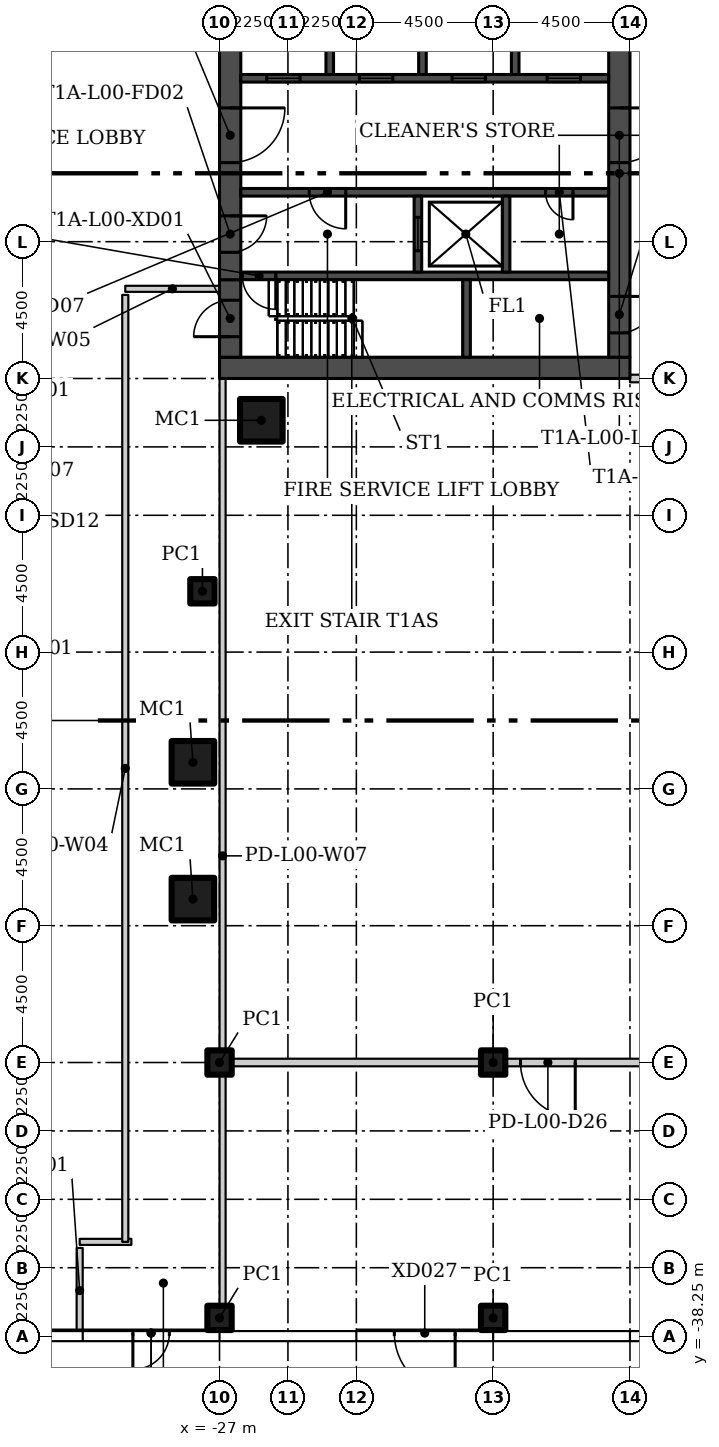
"""IFC4 building model, lengths in metres.
Left out: names, types, materials, properties, quantities, classifications, styles, units other than length and angle.
Written with IfcOpenShell. Run it as: python <this file> out.ifc"""

import sys

from ifc_helpers import new_model, si_unit, direction, frame, frame_2d, origin, origin_2d, place, context, subcontext, project, spatial, rectangle, hollow_rectangle, extrude, element, fill, save


model = new_model("IFC4")
c1 = context("Model", 3, precision=1e-05, world=origin(), true_north=direction((0.0, 1.0)))
c2 = subcontext(c1, "Body", "Model", "MODEL_VIEW")
j1 = project(units=[si_unit("LENGTHUNIT", "METRE"), si_unit("PLANEANGLEUNIT", "RADIAN")], contexts=[c1])
p1 = place(None, origin())
s1 = spatial("IfcSite", under=j1, at=p1, CompositionType="ELEMENT")
p2 = place(p1, origin())
s2 = spatial("IfcBuilding", under=s1, at=p2, CompositionType="ELEMENT")
p3 = place(p2, origin())
s3 = spatial("IfcBuildingStorey", under=s2, at=p3, CompositionType="ELEMENT", Elevation=0.0)
p4 = place(p3, frame((-25.625, -8.125, 0.0)))
e1 = element("IfcColumn", 1, at=p4, inside=s3, PredefinedType="COLUMN", context=c2, shape_type="SweptSolid", body=[
    extrude(hollow_rectangle(XDim=1.4, YDim=1.4, WallThickness=0.06, at=origin_2d()), origin(), (0.0, 0.0, 1.0), 6.5),
])
p5 = place(p3, frame((-27.562, -13.75, 0.0)))
e2 = element("IfcColumn", 2, at=p5, inside=s3, PredefinedType="COLUMN", context=c2, shape_type="SweptSolid", body=[
    extrude(hollow_rectangle(XDim=0.8, YDim=0.8, WallThickness=0.03, at=origin_2d()), origin(), (0.0, 0.0, 1.0), 6.1),
])
for number, where in (
    (3, (-27.875, -19.375, 0.0)),
    (4, (-27.875, -23.875, 0.0)),
):
    element("IfcColumn", number, at=place(p3, frame(where)), inside=s3, PredefinedType="COLUMN", context=c2, shape_type="SweptSolid", body=[
        extrude(hollow_rectangle(XDim=1.4, YDim=1.4, WallThickness=0.06, at=origin_2d()), origin(), (0.0, 0.0, 1.0), 6.1),
    ])
for number, where in (
    (5, (-27.0, -37.65, 0.0)),
    (6, (-27.0, -29.25, 0.0)),
    (7, (-18.0, -37.65, 0.0)),
    (8, (-18.0, -29.25, 0.0)),
):
    element("IfcColumn", number, at=place(p3, frame(where)), inside=s3, PredefinedType="COLUMN", context=c2, shape_type="SweptSolid", body=[
        extrude(hollow_rectangle(XDim=0.8, YDim=0.8, WallThickness=0.03, at=origin_2d()), origin(), (0.0, 0.0, 1.0), 6.1),
    ])
p6 = place(p3, frame((-31.6, -35.35, 0.0), z_axis=(0.0, 0.0, 1.0), x_axis=(0.0, -1.0, 0.0)))
e9 = element("IfcWall", 9, at=p6, inside=s3, PredefinedType="PARTITIONING", context=c2, shape_type="SweptSolid", body=[
    extrude(rectangle(XDim=2.805, YDim=0.2, at=frame_2d((1.402, 0.0))), origin(), (0.0, 0.0, 1.0), 6.1),
])
p7 = place(p3, frame((-29.9, -35.15, 0.0), z_axis=(0.0, 0.0, 1.0), x_axis=(-1.0, 0.0, 0.0)))
e10 = element("IfcWall", 10, at=p7, inside=s3, PredefinedType="PARTITIONING", context=c2, shape_type="SweptSolid", body=[
    extrude(rectangle(XDim=1.7, YDim=0.2, at=frame_2d((0.85, 0.0))), origin(), (0.0, 0.0, 1.0), 6.1),
])
p8 = place(p3, frame((-30.1, -4.0, 0.0), z_axis=(0.0, 0.0, 1.0), x_axis=(0.0, -1.0, 0.0)))
e11 = element("IfcWall", 11, at=p8, inside=s3, PredefinedType="PARTITIONING", context=c2, shape_type="SweptSolid", body=[
    extrude(rectangle(XDim=31.149, YDim=0.2, at=frame_2d((15.575, 0.0))), origin(), (0.0, 0.0, 1.0), 6.1),
])
p9 = place(p3, frame((-27.0, -3.8, 0.0), z_axis=(0.0, 0.0, 1.0), x_axis=(-1.0, 0.0, 0.0)))
e12 = element("IfcWall", 12, at=p9, inside=s3, PredefinedType="PARTITIONING", context=c2, shape_type="SweptSolid", body=[
    extrude(rectangle(XDim=3.1, YDim=0.2, at=frame_2d((1.55, 0.0))), origin(), (0.0, 0.0, 1.0), 6.1),
])
p10 = place(p3, frame((-26.9, -38.155, 0.0), z_axis=(0.0, 0.0, 1.0), x_axis=(0.0, 1.0, 0.0)))
e13 = element("IfcWall", 13, at=p10, inside=s3, PredefinedType="PARTITIONING", context=c2, shape_type="SweptSolid", body=[
    extrude(rectangle(XDim=31.405, YDim=0.2, at=frame_2d((15.703, 0.0))), origin(), (0.0, 0.0, 1.0), 12.1),
])
p11 = place(p3, frame((-13.5, -6.75, 0.0)))
e14 = element("IfcWall", 14, at=p11, inside=s3, PredefinedType="PARTITIONING", context=c2, shape_type="SweptSolid", body=[
    extrude(rectangle(XDim=27.0, YDim=0.25, at=frame_2d((13.5, 0.0))), origin(), (0.0, 0.0, 1.0), 12.1),
])
p12 = place(p11, frame((14.25, 0.0, 0.0)))
e15 = element("IfcOpeningElement", 15, at=p12, cuts=e14, PredefinedType="OPENING", context=c2, shape_type="SweptSolid", body=[
    extrude(rectangle(XDim=1.8, YDim=2.4, at=frame_2d((0.9, 1.2))), frame((0.0, 0.135, 0.0), z_axis=(0.0, -1.0, 0.0), x_axis=(1.0, 0.0, 0.0)), (0.0, 0.0, 1.0), 0.27),
])
p13 = place(p3, frame((27.125, -29.25, 0.0), z_axis=(0.0, 0.0, 1.0), x_axis=(-1.0, 0.0, 0.0)))
e16 = element("IfcWall", 16, at=p13, inside=s3, PredefinedType="PARTITIONING", context=c2, shape_type="SweptSolid", body=[
    extrude(rectangle(XDim=54.025, YDim=0.25, at=frame_2d((27.012, 0.0))), origin(), (0.0, 0.0, 1.0), 12.1),
])
p14 = place(p13, frame((10.025, 0.0, 0.0)))
e17 = element("IfcOpeningElement", 17, at=p14, cuts=e16, PredefinedType="OPENING", context=c2, shape_type="SweptSolid", body=[
    extrude(rectangle(XDim=1.8, YDim=2.4, at=frame_2d((0.9, 1.2))), frame((0.0, 0.135, 0.0), z_axis=(0.0, -1.0, 0.0), x_axis=(1.0, 0.0, 0.0)), (0.0, 0.0, 1.0), 0.27),
])
p15 = place(p13, frame((42.425, 0.0, 0.0)))
e18 = element("IfcOpeningElement", 18, at=p15, cuts=e16, PredefinedType="OPENING", context=c2, shape_type="SweptSolid", body=[
    extrude(rectangle(XDim=1.8, YDim=2.4, at=frame_2d((0.9, 1.2))), frame((0.0, 0.135, 0.0), z_axis=(0.0, -1.0, 0.0), x_axis=(1.0, 0.0, 0.0)), (0.0, 0.0, 1.0), 0.27),
])
p16 = place(p3, frame((-26.993, -38.15, 0.0), z_axis=(0.0, 0.0, 1.0), x_axis=(-1.0, 0.0, 0.0)))
e19 = element("IfcWall", 19, at=p16, inside=s3, PredefinedType="SOLIDWALL", context=c2, shape_type="SweptSolid", body=[
    extrude(rectangle(XDim=4.514, YDim=0.2, at=frame_2d((2.257, 0.0))), origin(), (0.0, 0.0, 1.0), 3.0),
])
p17 = place(p16, frame((1.657, 0.0, 0.0)))
e20 = element("IfcOpeningElement", 20, at=p17, cuts=e19, PredefinedType="OPENING", context=c2, shape_type="SweptSolid", body=[
    extrude(rectangle(XDim=1.2, YDim=2.4, at=frame_2d((0.6, 1.2))), frame((0.0, 0.11, 0.0), z_axis=(0.0, -1.0, 0.0), x_axis=(1.0, 0.0, 0.0)), (0.0, 0.0, 1.0), 0.22),
])
p18 = place(p3, frame((-31.533, -38.15, 0.0), z_axis=(0.0, 0.0, 1.0), x_axis=(-1.0, 0.0, 0.0)))
e21 = element("IfcWall", 21, at=p18, inside=s3, PredefinedType="SOLIDWALL", context=c2, shape_type="SweptSolid", body=[
    extrude(rectangle(XDim=4.434, YDim=0.2, at=frame_2d((2.217, 0.0))), origin(), (0.0, 0.0, 1.0), 3.0),
])
p19 = place(p18, frame((1.217, 0.0, 0.0)))
e22 = element("IfcOpeningElement", 22, at=p19, cuts=e21, PredefinedType="OPENING", context=c2, shape_type="SweptSolid", body=[
    extrude(rectangle(XDim=2.0, YDim=2.4, at=frame_2d((1.0, 1.2))), frame((0.0, 0.11, 0.0), z_axis=(0.0, -1.0, 0.0), x_axis=(1.0, 0.0, 0.0)), (0.0, 0.0, 1.0), 0.22),
])
p20 = place(p3, frame((-18.04, -38.15, 0.0), z_axis=(0.0, 0.0, 1.0), x_axis=(-1.0, 0.0, 0.0)))
e23 = element("IfcWall", 23, at=p20, inside=s3, PredefinedType="SOLIDWALL", context=c2, shape_type="SweptSolid", body=[
    extrude(rectangle(XDim=4.42, YDim=0.2, at=frame_2d((2.21, 0.0))), origin(), (0.0, 0.0, 1.0), 3.0),
])
p21 = place(p20, frame((1.21, 0.0, 0.0)))
e24 = element("IfcOpeningElement", 24, at=p21, cuts=e23, PredefinedType="OPENING", context=c2, shape_type="SweptSolid", body=[
    extrude(rectangle(XDim=2.0, YDim=2.4, at=frame_2d((1.0, 1.2))), frame((0.0, 0.11, 0.0), z_axis=(0.0, -1.0, 0.0), x_axis=(1.0, 0.0, 0.0)), (0.0, 0.0, 1.0), 0.22),
])
p22 = place(p3, frame((-27.0, -6.4, 0.0)))
e25 = element("IfcWall", 25, at=p22, inside=s3, PredefinedType="SHEAR", context=c2, shape_type="SweptSolid", body=[
    extrude(rectangle(XDim=13.5, YDim=0.7, at=frame_2d((6.75, 0.0))), origin(), (0.0, 0.0, 1.0), 6.1),
])
p23 = place(p3, frame((-26.65, -6.05, 0.0), z_axis=(0.0, 0.0, 1.0), x_axis=(0.0, 1.0, 0.0)))
e26 = element("IfcWall", 26, at=p23, inside=s3, PredefinedType="SHEAR", context=c2, shape_type="SweptSolid", body=[
    extrude(rectangle(XDim=2.55, YDim=0.7, at=frame_2d((1.275, 0.0))), origin(), (0.0, 0.0, 1.0), 6.1),
])
p24 = place(p23, frame((0.675, 0.0, 0.0)))
e27 = element("IfcOpeningElement", 27, at=p24, cuts=e26, PredefinedType="OPENING", context=c2, shape_type="SweptSolid", body=[
    extrude(rectangle(XDim=1.2, YDim=2.4, at=frame_2d((0.6, 1.2))), frame((0.0, 0.36, 0.0), z_axis=(0.0, -1.0, 0.0), x_axis=(1.0, 0.0, 0.0)), (0.0, 0.0, 1.0), 0.72),
])
p25 = place(p3, frame((-26.65, 6.05, 0.0), z_axis=(0.0, 0.0, 1.0), x_axis=(0.0, -1.0, 0.0)))
e28 = element("IfcWall", 28, at=p25, inside=s3, PredefinedType="SHEAR", context=c2, shape_type="SweptSolid", body=[
    extrude(rectangle(XDim=9.55, YDim=0.7, at=frame_2d((4.775, 0.0))), origin(), (0.0, 0.0, 1.0), 6.1),
])
p26 = place(p25, frame((7.45, 0.0, 0.0)))
e29 = element("IfcOpeningElement", 29, at=p26, cuts=e28, PredefinedType="OPENING", context=c2, shape_type="SweptSolid", body=[
    extrude(rectangle(XDim=1.2, YDim=2.1, at=frame_2d((0.6, 1.05))), frame((0.0, 0.36, 0.0), z_axis=(0.0, -1.0, 0.0), x_axis=(1.0, 0.0, 0.0)), (0.0, 0.0, 1.0), 0.72),
])
p27 = place(p25, frame((3.9, 0.0, 0.0)))
e30 = element("IfcOpeningElement", 30, at=p27, cuts=e28, PredefinedType="OPENING", context=c2, shape_type="SweptSolid", body=[
    extrude(rectangle(XDim=1.8, YDim=2.4, at=frame_2d((0.9, 1.2))), frame((0.0, 0.36, 0.0), z_axis=(0.0, -1.0, 0.0), x_axis=(1.0, 0.0, 0.0)), (0.0, 0.0, 1.0), 0.72),
])
p28 = place(p3, frame((-13.85, 6.05, 0.0), z_axis=(0.0, 0.0, 1.0), x_axis=(0.0, -1.0, 0.0)))
e31 = element("IfcWall", 31, at=p28, inside=s3, PredefinedType="SHEAR", context=c2, shape_type="SweptSolid", body=[
    extrude(rectangle(XDim=12.1, YDim=0.7, at=frame_2d((6.05, 0.0))), origin(), (0.0, 0.0, 1.0), 6.1),
])
p29 = place(p28, frame((10.1, 0.0, 0.0)))
e32 = element("IfcOpeningElement", 32, at=p29, cuts=e31, PredefinedType="OPENING", context=c2, shape_type="SweptSolid", body=[
    extrude(rectangle(XDim=1.2, YDim=2.1, at=frame_2d((0.6, 1.05))), frame((0.0, 0.36, 0.0), z_axis=(0.0, -1.0, 0.0), x_axis=(1.0, 0.0, 0.0)), (0.0, 0.0, 1.0), 0.72),
])
p30 = place(p28, frame((3.9, 0.0, 0.0)))
e33 = element("IfcOpeningElement", 33, at=p30, cuts=e31, PredefinedType="OPENING", context=c2, shape_type="SweptSolid", body=[
    extrude(rectangle(XDim=1.8, YDim=2.4, at=frame_2d((0.9, 1.2))), frame((0.0, 0.36, 0.0), z_axis=(0.0, -1.0, 0.0), x_axis=(1.0, 0.0, 0.0)), (0.0, 0.0, 1.0), 0.72),
])
p31 = place(p3, frame((-14.2, -3.375, 0.0), z_axis=(0.0, 0.0, 1.0), x_axis=(-1.0, 0.0, 0.0)))
e34 = element("IfcWall", 34, at=p31, inside=s3, PredefinedType="SHEAR", context=c2, shape_type="SweptSolid", body=[
    extrude(rectangle(XDim=12.1, YDim=0.25, at=frame_2d((6.05, 0.0))), origin(), (0.0, 0.0, 1.0), 6.1),
])
p32 = place(p31, frame((10.95, 0.0, 0.0)))
e35 = element("IfcOpeningElement", 35, at=p32, cuts=e34, PredefinedType="OPENING", context=c2, shape_type="SweptSolid", body=[
    extrude(rectangle(XDim=1.1, YDim=2.1, at=frame_2d((0.55, 1.05))), frame((0.0, 0.135, 0.0), z_axis=(0.0, -1.0, 0.0), x_axis=(1.0, 0.0, 0.0)), (0.0, 0.0, 1.0), 0.27),
])
p33 = place(p3, frame((-18.875, -6.05, 0.0), z_axis=(0.0, 0.0, 1.0), x_axis=(0.0, 1.0, 0.0)))
e36 = element("IfcWall", 36, at=p33, inside=s3, PredefinedType="SHEAR", context=c2, shape_type="SweptSolid", body=[
    extrude(rectangle(XDim=2.55, YDim=0.25, at=frame_2d((1.275, 0.0))), origin(), (0.0, 0.0, 1.0), 6.1),
])
p34 = place(p3, frame((-14.2, -0.625, 0.0), z_axis=(0.0, 0.0, 1.0), x_axis=(-1.0, 0.0, 0.0)))
e37 = element("IfcWall", 37, at=p34, inside=s3, PredefinedType="SHEAR", context=c2, shape_type="SweptSolid", body=[
    extrude(rectangle(XDim=12.1, YDim=0.25, at=frame_2d((6.05, 0.0))), origin(), (0.0, 0.0, 1.0), 6.1),
])
p35 = place(p34, frame((8.65, 0.0, 0.0)))
e38 = element("IfcOpeningElement", 38, at=p35, cuts=e37, PredefinedType="OPENING", context=c2, shape_type="SweptSolid", body=[
    extrude(rectangle(XDim=1.2, YDim=2.1, at=frame_2d((0.6, 1.05))), frame((0.0, 0.135, 0.0), z_axis=(0.0, -1.0, 0.0), x_axis=(1.0, 0.0, 0.0)), (0.0, 0.0, 1.0), 0.27),
])
p36 = place(p34, frame((1.175, 0.0, 0.0)))
e39 = element("IfcOpeningElement", 39, at=p36, cuts=e37, PredefinedType="OPENING", context=c2, shape_type="SweptSolid", body=[
    extrude(rectangle(XDim=0.9, YDim=2.1, at=frame_2d((0.45, 1.05))), frame((0.0, 0.135, 0.0), z_axis=(0.0, -1.0, 0.0), x_axis=(1.0, 0.0, 0.0)), (0.0, 0.0, 1.0), 0.27),
])
p37 = place(p3, frame((-20.475, -3.25, 0.0), z_axis=(0.0, 0.0, 1.0), x_axis=(0.0, 1.0, 0.0)))
e40 = element("IfcWall", 40, at=p37, inside=s3, PredefinedType="SHEAR", context=c2, shape_type="SweptSolid", body=[
    extrude(rectangle(XDim=2.5, YDim=0.25, at=frame_2d((1.25, 0.0))), origin(), (0.0, 0.0, 1.0), 6.1),
])
p38 = place(p37, frame((0.7, 0.0, 0.0)))
e41 = element("IfcOpeningElement", 41, at=p38, cuts=e40, PredefinedType="OPENING", context=c2, shape_type="SweptSolid", body=[
    extrude(rectangle(XDim=1.1, YDim=2.1, at=frame_2d((0.55, 1.05))), frame((0.0, 0.135, 0.0), z_axis=(0.0, -1.0, 0.0), x_axis=(1.0, 0.0, 0.0)), (0.0, 0.0, 1.0), 0.27),
])
p39 = place(p3, frame((-17.575, -3.25, 0.0), z_axis=(0.0, 0.0, 1.0), x_axis=(0.0, 1.0, 0.0)))
e42 = element("IfcWall", 42, at=p39, inside=s3, PredefinedType="SHEAR", context=c2, shape_type="SweptSolid", body=[
    extrude(rectangle(XDim=2.5, YDim=0.25, at=frame_2d((1.25, 0.0))), origin(), (0.0, 0.0, 1.0), 6.1),
])
p40 = place(p3, frame((-26.3, 3.125, 0.0)))
e43 = element("IfcWall", 43, at=p40, inside=s3, PredefinedType="SHEAR", context=c2, shape_type="SweptSolid", body=[
    extrude(rectangle(XDim=12.1, YDim=0.25, at=frame_2d((6.05, 0.0))), origin(), (0.0, 0.0, 1.0), 6.1),
])
p41 = place(p40, frame((0.85, 0.0, 0.0)))
e44 = element("IfcOpeningElement", 44, at=p41, cuts=e43, PredefinedType="OPENING", context=c2, shape_type="SweptSolid", body=[
    extrude(rectangle(XDim=1.1, YDim=2.1, at=frame_2d((0.55, 1.05))), frame((0.0, 0.135, 0.0), z_axis=(0.0, -1.0, 0.0), x_axis=(1.0, 0.0, 0.0)), (0.0, 0.0, 1.0), 0.27),
])
p42 = place(p40, frame((3.9, 0.0, 0.0)))
e45 = element("IfcOpeningElement", 45, at=p42, cuts=e43, PredefinedType="OPENING", context=c2, shape_type="SweptSolid", body=[
    extrude(rectangle(XDim=1.1, YDim=2.1, at=frame_2d((0.55, 1.05))), frame((0.0, 0.135, 0.0), z_axis=(0.0, -1.0, 0.0), x_axis=(1.0, 0.0, 0.0)), (0.0, 0.0, 1.0), 0.27),
])
p43 = place(p40, frame((6.95, 0.0, 0.0)))
e46 = element("IfcOpeningElement", 46, at=p43, cuts=e43, PredefinedType="OPENING", context=c2, shape_type="SweptSolid", body=[
    extrude(rectangle(XDim=1.1, YDim=2.1, at=frame_2d((0.55, 1.05))), frame((0.0, 0.135, 0.0), z_axis=(0.0, -1.0, 0.0), x_axis=(1.0, 0.0, 0.0)), (0.0, 0.0, 1.0), 0.27),
])
p44 = place(p40, frame((10.075, 0.0, 0.0)))
e47 = element("IfcOpeningElement", 47, at=p44, cuts=e43, PredefinedType="OPENING", context=c2, shape_type="SweptSolid", body=[
    extrude(rectangle(XDim=1.1, YDim=2.1, at=frame_2d((0.55, 1.05))), frame((0.0, 0.135, 0.0), z_axis=(0.0, -1.0, 0.0), x_axis=(1.0, 0.0, 0.0)), (0.0, 0.0, 1.0), 0.27),
])
for number, where, z_axis, x_axis in (
    (48, (-23.375, 3.25, 0.0), (0.0, 0.0, 1.0), (0.0, 1.0, 0.0)),
    (49, (-20.325, 3.25, 0.0), (0.0, 0.0, 1.0), (0.0, 1.0, 0.0)),
    (50, (-17.275, 3.25, 0.0), (0.0, 0.0, 1.0), (0.0, 1.0, 0.0)),
):
    element("IfcWall", number, at=place(p3, frame(where, z_axis=z_axis, x_axis=x_axis)), inside=s3, PredefinedType="SHEAR", context=c2, shape_type="SweptSolid", body=[
        extrude(rectangle(XDim=2.8, YDim=0.25, at=frame_2d((1.4, 0.0))), origin(), (0.0, 0.0, 1.0), 6.1),
    ])
p45 = place(p15, origin())
e51 = element("IfcDoor", 51, at=p45, inside=s3, OperationType="DOUBLE_DOOR_SINGLE_SWING", PredefinedType="DOOR", context=c2, shape_type="SweptSolid", body=[
    extrude(rectangle(XDim=1.8, YDim=2.4, at=frame_2d((0.9, 1.2))), frame((0.0, 0.025, 0.0), z_axis=(0.0, -1.0, 0.0), x_axis=(1.0, 0.0, 0.0)), (0.0, 0.0, 1.0), 0.05),
])
fill(e18, e51)
p46 = place(p17, origin())
e52 = element("IfcDoor", 52, at=p46, inside=s3, OperationType="SINGLE_SWING_RIGHT", PredefinedType="DOOR", context=c2, shape_type="SweptSolid", body=[
    extrude(rectangle(XDim=1.2, YDim=2.4, at=frame_2d((0.6, 1.2))), frame((0.0, 0.025, 0.0), z_axis=(0.0, -1.0, 0.0), x_axis=(1.0, 0.0, 0.0)), (0.0, 0.0, 1.0), 0.05),
])
fill(e20, e52)
p47 = place(p21, origin())
e53 = element("IfcDoor", 53, at=p47, inside=s3, OperationType="DOUBLE_DOOR_SINGLE_SWING", PredefinedType="DOOR", context=c2, shape_type="SweptSolid", body=[
    extrude(rectangle(XDim=2.0, YDim=2.4, at=frame_2d((1.0, 1.2))), frame((0.0, 0.025, 0.0), z_axis=(0.0, -1.0, 0.0), x_axis=(1.0, 0.0, 0.0)), (0.0, 0.0, 1.0), 0.05),
])
fill(e24, e53)
p48 = place(p24, origin())
e54 = element("IfcDoor", 54, at=p48, inside=s3, OperationType="SINGLE_SWING_LEFT", PredefinedType="DOOR", context=c2, shape_type="SweptSolid", body=[
    extrude(rectangle(XDim=1.2, YDim=2.4, at=frame_2d((0.6, 1.2))), frame((0.0, 0.025, 0.0), z_axis=(0.0, -1.0, 0.0), x_axis=(1.0, 0.0, 0.0)), (0.0, 0.0, 1.0), 0.05),
])
fill(e27, e54)
p49 = place(p26, origin())
e55 = element("IfcDoor", 55, at=p49, inside=s3, OperationType="SINGLE_SWING_RIGHT", PredefinedType="DOOR", context=c2, shape_type="SweptSolid", body=[
    extrude(rectangle(XDim=1.2, YDim=2.1, at=frame_2d((0.6, 1.05))), frame((0.0, 0.025, 0.0), z_axis=(0.0, -1.0, 0.0), x_axis=(1.0, 0.0, 0.0)), (0.0, 0.0, 1.0), 0.05),
])
fill(e29, e55)
p50 = place(p27, origin())
e56 = element("IfcDoor", 56, at=p50, inside=s3, OperationType="DOUBLE_DOOR_SINGLE_SWING", PredefinedType="DOOR", context=c2, shape_type="SweptSolid", body=[
    extrude(rectangle(XDim=1.8, YDim=2.4, at=frame_2d((0.9, 1.2))), frame((0.0, 0.025, 0.0), z_axis=(0.0, -1.0, 0.0), x_axis=(1.0, 0.0, 0.0)), (0.0, 0.0, 1.0), 0.05),
])
fill(e30, e56)
p51 = place(p29, origin())
e57 = element("IfcDoor", 57, at=p51, inside=s3, OperationType="SINGLE_SWING_RIGHT", PredefinedType="DOOR", context=c2, shape_type="SweptSolid", body=[
    extrude(rectangle(XDim=1.2, YDim=2.1, at=frame_2d((0.6, 1.05))), frame((0.0, 0.025, 0.0), z_axis=(0.0, -1.0, 0.0), x_axis=(1.0, 0.0, 0.0)), (0.0, 0.0, 1.0), 0.05),
])
fill(e32, e57)
p52 = place(p30, origin())
e58 = element("IfcDoor", 58, at=p52, inside=s3, OperationType="DOUBLE_DOOR_SINGLE_SWING", PredefinedType="DOOR", context=c2, shape_type="SweptSolid", body=[
    extrude(rectangle(XDim=1.8, YDim=2.4, at=frame_2d((0.9, 1.2))), frame((0.0, 0.025, 0.0), z_axis=(0.0, -1.0, 0.0), x_axis=(1.0, 0.0, 0.0)), (0.0, 0.0, 1.0), 0.05),
])
fill(e33, e58)
p53 = place(p32, origin())
e59 = element("IfcDoor", 59, at=p53, inside=s3, OperationType="SINGLE_SWING_RIGHT", PredefinedType="DOOR", context=c2, shape_type="SweptSolid", body=[
    extrude(rectangle(XDim=1.1, YDim=2.1, at=frame_2d((0.55, 1.05))), frame((0.0, 0.025, 0.0), z_axis=(0.0, -1.0, 0.0), x_axis=(1.0, 0.0, 0.0)), (0.0, 0.0, 1.0), 0.05),
])
fill(e35, e59)
p54 = place(p35, origin())
e60 = element("IfcDoor", 60, at=p54, inside=s3, OperationType="SINGLE_SWING_RIGHT", PredefinedType="DOOR", context=c2, shape_type="SweptSolid", body=[
    extrude(rectangle(XDim=1.2, YDim=2.1, at=frame_2d((0.6, 1.05))), frame((0.0, 0.025, 0.0), z_axis=(0.0, -1.0, 0.0), x_axis=(1.0, 0.0, 0.0)), (0.0, 0.0, 1.0), 0.05),
])
fill(e38, e60)
p55 = place(p36, origin())
e61 = element("IfcDoor", 61, at=p55, inside=s3, OperationType="SINGLE_SWING_LEFT", PredefinedType="DOOR", context=c2, shape_type="SweptSolid", body=[
    extrude(rectangle(XDim=0.9, YDim=2.1, at=frame_2d((0.45, 1.05))), frame((0.0, 0.025, 0.0), z_axis=(0.0, -1.0, 0.0), x_axis=(1.0, 0.0, 0.0)), (0.0, 0.0, 1.0), 0.05),
])
fill(e39, e61)
p56 = place(p38, origin())
e62 = element("IfcDoor", 62, at=p56, inside=s3, OperationType="SLIDING_TO_LEFT", PredefinedType="DOOR", context=c2, shape_type="SweptSolid", body=[
    extrude(rectangle(XDim=1.1, YDim=2.1, at=frame_2d((0.55, 1.05))), frame((0.0, 0.025, 0.0), z_axis=(0.0, -1.0, 0.0), x_axis=(1.0, 0.0, 0.0)), (0.0, 0.0, 1.0), 0.05),
])
fill(e41, e62)
p57 = place(p41, origin())
e63 = element("IfcDoor", 63, at=p57, inside=s3, OperationType="SLIDING_TO_LEFT", PredefinedType="DOOR", context=c2, shape_type="SweptSolid", body=[
    extrude(rectangle(XDim=1.1, YDim=2.1, at=frame_2d((0.55, 1.05))), frame((0.0, 0.025, 0.0), z_axis=(0.0, -1.0, 0.0), x_axis=(1.0, 0.0, 0.0)), (0.0, 0.0, 1.0), 0.05),
])
fill(e44, e63)
p58 = place(p42, origin())
e64 = element("IfcDoor", 64, at=p58, inside=s3, OperationType="SLIDING_TO_LEFT", PredefinedType="DOOR", context=c2, shape_type="SweptSolid", body=[
    extrude(rectangle(XDim=1.1, YDim=2.1, at=frame_2d((0.55, 1.05))), frame((0.0, 0.025, 0.0), z_axis=(0.0, -1.0, 0.0), x_axis=(1.0, 0.0, 0.0)), (0.0, 0.0, 1.0), 0.05),
])
fill(e45, e64)
p59 = place(p43, origin())
e65 = element("IfcDoor", 65, at=p59, inside=s3, OperationType="SLIDING_TO_LEFT", PredefinedType="DOOR", context=c2, shape_type="SweptSolid", body=[
    extrude(rectangle(XDim=1.1, YDim=2.1, at=frame_2d((0.55, 1.05))), frame((0.0, 0.025, 0.0), z_axis=(0.0, -1.0, 0.0), x_axis=(1.0, 0.0, 0.0)), (0.0, 0.0, 1.0), 0.05),
])
fill(e46, e65)
p60 = place(p44, origin())
e66 = element("IfcDoor", 66, at=p60, inside=s3, OperationType="SLIDING_TO_LEFT", PredefinedType="DOOR", context=c2, shape_type="SweptSolid", body=[
    extrude(rectangle(XDim=1.1, YDim=2.1, at=frame_2d((0.55, 1.05))), frame((0.0, 0.025, 0.0), z_axis=(0.0, -1.0, 0.0), x_axis=(1.0, 0.0, 0.0)), (0.0, 0.0, 1.0), 0.05),
])
fill(e47, e66)
save(model, sys.argv[1])
